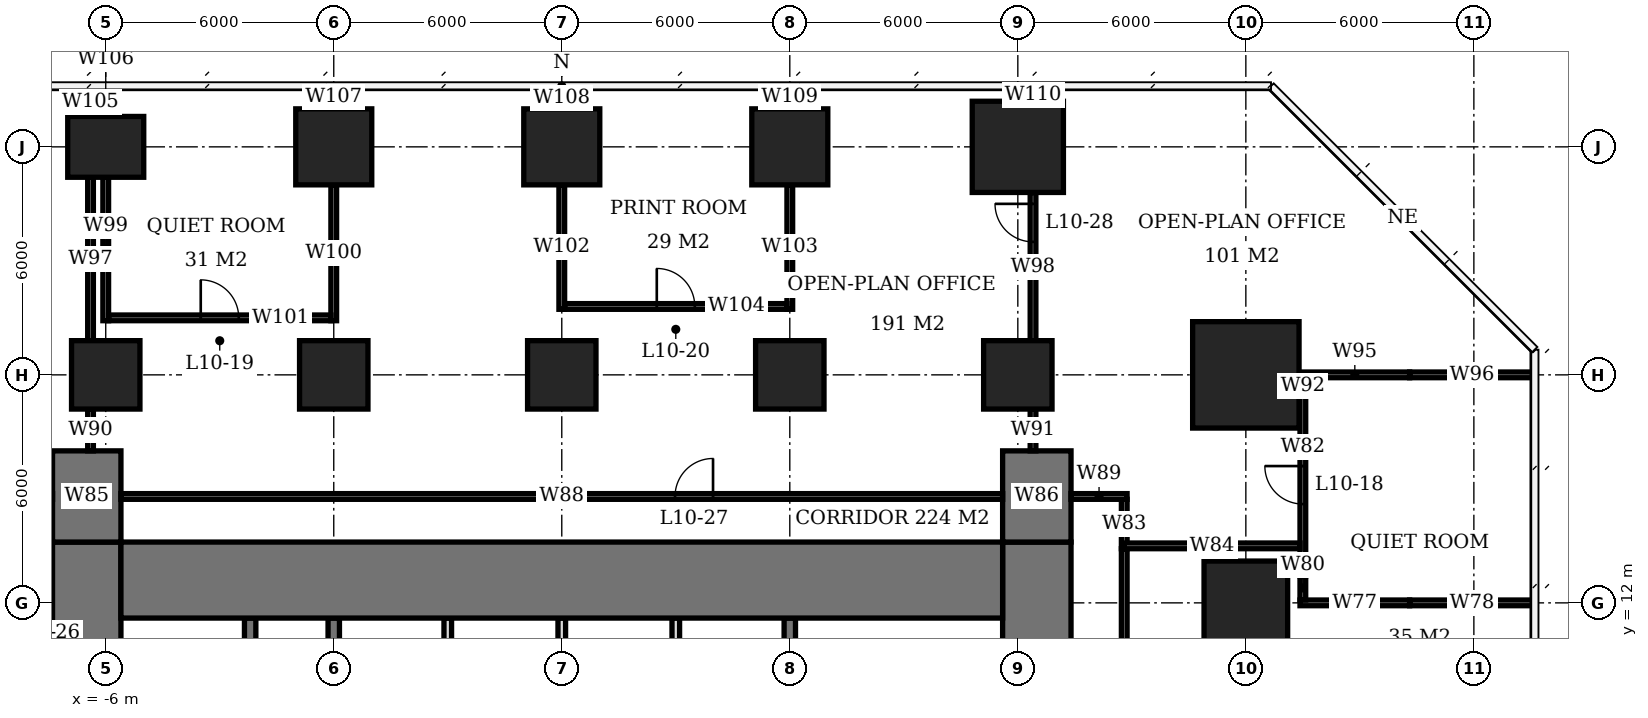
"""IFC4 building model, lengths in metres.
Left out: names, types, materials, properties, quantities, classifications, styles, units other than length and angle.
Written with IfcOpenShell. Run it as: python <this file> out.ifc"""

import sys

from ifc_helpers import new_model, si_unit, direction, frame, frame_2d, origin, origin_2d, place, context, subcontext, project, spatial, rectangle, extrude, element, fill, save


model = new_model("IFC4")
c1 = context("Model", 3, precision=1e-05, world=origin(), true_north=direction((0.0, 1.0)))
c2 = subcontext(c1, "Body", "Model", "MODEL_VIEW")
j1 = project(units=[si_unit("LENGTHUNIT", "METRE"), si_unit("PLANEANGLEUNIT", "RADIAN")], contexts=[c1])
p1 = place(None, origin())
s1 = spatial("IfcSite", under=j1, at=p1, CompositionType="ELEMENT")
p2 = place(p1, origin())
s2 = spatial("IfcBuilding", under=s1, at=p2, CompositionType="ELEMENT")
p3 = place(p2, frame((0.0, 0.0, 45.5)))
s3 = spatial("IfcBuildingStorey", under=s2, at=p3, CompositionType="ELEMENT", Elevation=45.5)
p4 = place(p3, frame((-6.0, 18.0, 0.0), z_axis=(0.0, 0.0, 1.0), x_axis=(1.0, 0.0, 0.0)))
e1 = element("IfcColumn", 1, at=p4, inside=s3, PredefinedType="COLUMN", context=c2, shape_type="SweptSolid", body=[
    extrude(rectangle(XDim=1.8, YDim=1.8, at=origin_2d()), origin(), (0.0, 0.0, 1.0), 3.9),
])
p5 = place(p3, frame((-6.0, 24.0, 0.0), z_axis=(0.0, 0.0, 1.0), x_axis=(1.0, 0.0, 0.0)))
e2 = element("IfcColumn", 2, at=p5, inside=s3, PredefinedType="COLUMN", context=c2, shape_type="SweptSolid", body=[
    extrude(rectangle(XDim=2.0, YDim=1.6, at=origin_2d()), origin(), (0.0, 0.0, 1.0), 3.9),
])
p6 = place(p3, frame((0.0, 18.0, 0.0), z_axis=(0.0, 0.0, 1.0), x_axis=(1.0, 0.0, 0.0)))
e3 = element("IfcColumn", 3, at=p6, inside=s3, PredefinedType="COLUMN", context=c2, shape_type="SweptSolid", body=[
    extrude(rectangle(XDim=1.8, YDim=1.8, at=origin_2d()), origin(), (0.0, 0.0, 1.0), 3.9),
])
p7 = place(p3, frame((0.0, 24.0, 0.0), z_axis=(0.0, 0.0, 1.0), x_axis=(1.0, 0.0, 0.0)))
e4 = element("IfcColumn", 4, at=p7, inside=s3, PredefinedType="COLUMN", context=c2, shape_type="SweptSolid", body=[
    extrude(rectangle(XDim=2.0, YDim=2.0, at=origin_2d()), origin(), (0.0, 0.0, 1.0), 3.9),
])
p8 = place(p3, frame((6.0, 18.0, 0.0), z_axis=(0.0, 0.0, 1.0), x_axis=(1.0, 0.0, 0.0)))
e5 = element("IfcColumn", 5, at=p8, inside=s3, PredefinedType="COLUMN", context=c2, shape_type="SweptSolid", body=[
    extrude(rectangle(XDim=1.8, YDim=1.8, at=origin_2d()), origin(), (0.0, 0.0, 1.0), 3.9),
])
p9 = place(p3, frame((6.0, 24.0, 0.0), z_axis=(0.0, 0.0, 1.0), x_axis=(1.0, 0.0, 0.0)))
e6 = element("IfcColumn", 6, at=p9, inside=s3, PredefinedType="COLUMN", context=c2, shape_type="SweptSolid", body=[
    extrude(rectangle(XDim=2.0, YDim=2.0, at=origin_2d()), origin(), (0.0, 0.0, 1.0), 3.9),
])
p10 = place(p3, frame((12.0, 18.0, 0.0), z_axis=(0.0, 0.0, 1.0), x_axis=(1.0, 0.0, 0.0)))
e7 = element("IfcColumn", 7, at=p10, inside=s3, PredefinedType="COLUMN", context=c2, shape_type="SweptSolid", body=[
    extrude(rectangle(XDim=1.8, YDim=1.8, at=origin_2d()), origin(), (0.0, 0.0, 1.0), 3.9),
])
p11 = place(p3, frame((12.0, 24.0, 0.0), z_axis=(0.0, 0.0, 1.0), x_axis=(1.0, 0.0, 0.0)))
e8 = element("IfcColumn", 8, at=p11, inside=s3, PredefinedType="COLUMN", context=c2, shape_type="SweptSolid", body=[
    extrude(rectangle(XDim=2.0, YDim=2.0, at=origin_2d()), origin(), (0.0, 0.0, 1.0), 3.9),
])
p12 = place(p3, frame((18.0, 18.0, 0.0), z_axis=(0.0, 0.0, 1.0), x_axis=(1.0, 0.0, 0.0)))
e9 = element("IfcColumn", 9, at=p12, inside=s3, PredefinedType="COLUMN", context=c2, shape_type="SweptSolid", body=[
    extrude(rectangle(XDim=1.8, YDim=1.8, at=origin_2d()), origin(), (0.0, 0.0, 1.0), 3.9),
])
p13 = place(p3, frame((18.0, 24.0, 0.0), z_axis=(0.0, 0.0, 1.0), x_axis=(1.0, 0.0, 0.0)))
e10 = element("IfcColumn", 10, at=p13, inside=s3, PredefinedType="COLUMN", context=c2, shape_type="SweptSolid", body=[
    extrude(rectangle(XDim=2.4, YDim=2.4, at=origin_2d()), origin(), (0.0, 0.0, 1.0), 3.9),
])
p14 = place(p3, frame((24.0, 12.0, 0.0), z_axis=(0.0, 0.0, 1.0), x_axis=(1.0, 0.0, 0.0)))
e11 = element("IfcColumn", 11, at=p14, inside=s3, PredefinedType="COLUMN", context=c2, shape_type="SweptSolid", body=[
    extrude(rectangle(XDim=2.2, YDim=2.2, at=origin_2d()), origin(), (0.0, 0.0, 1.0), 3.9),
])
p15 = place(p3, frame((24.0, 18.0, 0.0), z_axis=(0.0, 0.0, 1.0), x_axis=(1.0, 0.0, 0.0)))
e12 = element("IfcColumn", 12, at=p15, inside=s3, PredefinedType="COLUMN", context=c2, shape_type="SweptSolid", body=[
    extrude(rectangle(XDim=2.8, YDim=2.8, at=origin_2d()), origin(), (0.0, 0.0, 1.0), 3.9),
])
p16 = place(p3, frame((-5.6, 12.6, 0.0), z_axis=(0.0, 0.0, 1.0), x_axis=(1.0, 0.0, 0.0)))
e13 = element("IfcWall", 13, at=p16, inside=s3, PredefinedType="SHEAR", context=c2, shape_type="SweptSolid", body=[
    extrude(rectangle(XDim=23.2, YDim=2.0, at=frame_2d((11.6, 0.0))), origin(), (0.0, 0.0, 1.0), 3.9),
])
p17 = place(p3, frame((-6.5, -7.6, 0.0), z_axis=(0.0, 0.0, 1.0), x_axis=(0.0, 1.0, 0.0)))
e14 = element("IfcWall", 14, at=p17, inside=s3, PredefinedType="SHEAR", context=c2, shape_type="SweptSolid", body=[
    extrude(rectangle(XDim=21.2, YDim=1.8, at=frame_2d((10.6, 0.0))), origin(), (0.0, 0.0, 1.0), 3.9),
])
p18 = place(p17, frame((7.8, 0.0, 0.0)))
e15 = element("IfcOpeningElement", 15, at=p18, cuts=e14, PredefinedType="OPENING", context=c2, shape_type="SweptSolid", body=[
    extrude(rectangle(XDim=1.8, YDim=2.4, at=frame_2d((0.9, 1.2))), frame((0.0, 0.91, 0.0), z_axis=(0.0, -1.0, 0.0), x_axis=(1.0, 0.0, 0.0)), (0.0, 0.0, 1.0), 1.82),
])
p19 = place(p3, frame((18.5, -7.6, 0.0), z_axis=(0.0, 0.0, 1.0), x_axis=(0.0, 1.0, 0.0)))
e16 = element("IfcWall", 16, at=p19, inside=s3, PredefinedType="SHEAR", context=c2, shape_type="SweptSolid", body=[
    extrude(rectangle(XDim=21.2, YDim=1.8, at=frame_2d((10.6, 0.0))), origin(), (0.0, 0.0, 1.0), 3.9),
])
p20 = place(p19, frame((9.2, 0.0, 0.0)))
e17 = element("IfcOpeningElement", 17, at=p20, cuts=e16, PredefinedType="OPENING", context=c2, shape_type="SweptSolid", body=[
    extrude(rectangle(XDim=1.8, YDim=2.4, at=frame_2d((0.9, 1.2))), frame((0.0, 0.91, 0.0), z_axis=(0.0, -1.0, 0.0), x_axis=(1.0, 0.0, 0.0)), (0.0, 0.0, 1.0), 1.82),
])
for number, where, z_axis, x_axis in (
    (18, (-6.5, 13.6, 0.0), (0.0, 0.0, 1.0), (0.0, 1.0, 0.0)),
    (19, (18.5, 13.6, 0.0), (0.0, 0.0, 1.0), (0.0, 1.0, 0.0)),
):
    element("IfcWall", number, at=place(p3, frame(where, z_axis=z_axis, x_axis=x_axis)), inside=s3, PredefinedType="SHEAR", context=c2, shape_type="SweptSolid", body=[
        extrude(rectangle(XDim=2.4, YDim=1.8, at=frame_2d((1.2, 0.0))), origin(), (0.0, 0.0, 1.0), 3.9),
    ])
p21 = place(p3, frame((0.0, 3.15, 0.0), z_axis=(0.0, 0.0, 1.0), x_axis=(0.0, 1.0, 0.0)))
e20 = element("IfcWall", 20, at=p21, inside=s3, PredefinedType="SHEAR", context=c2, shape_type="SweptSolid", body=[
    extrude(rectangle(XDim=8.45, YDim=0.3, at=frame_2d((4.225, 0.0))), origin(), (0.0, 0.0, 1.0), 3.9),
])
p22 = place(p3, frame((12.0, 6.15, 0.0), z_axis=(0.0, 0.0, 1.0), x_axis=(0.0, 1.0, 0.0)))
e21 = element("IfcWall", 21, at=p22, inside=s3, PredefinedType="SHEAR", context=c2, shape_type="SweptSolid", body=[
    extrude(rectangle(XDim=5.45, YDim=0.3, at=frame_2d((2.725, 0.0))), origin(), (0.0, 0.0, 1.0), 3.9),
])
p23 = place(p3, frame((-2.2, 3.15, 0.0), z_axis=(0.0, 0.0, 1.0), x_axis=(0.0, 1.0, 0.0)))
e22 = element("IfcWall", 22, at=p23, inside=s3, PredefinedType="SHEAR", context=c2, shape_type="SweptSolid", body=[
    extrude(rectangle(XDim=8.45, YDim=0.3, at=frame_2d((4.225, 0.0))), origin(), (0.0, 0.0, 1.0), 3.9),
])
for number, where, z_axis, x_axis in (
    (23, (3.0, 6.15, 0.0), (0.0, 0.0, 1.0), (0.0, 1.0, 0.0)),
    (24, (6.0, 6.15, 0.0), (0.0, 0.0, 1.0), (0.0, 1.0, 0.0)),
    (25, (9.0, 6.15, 0.0), (0.0, 0.0, 1.0), (0.0, 1.0, 0.0)),
):
    element("IfcWall", number, at=place(p3, frame(where, z_axis=z_axis, x_axis=x_axis)), inside=s3, PredefinedType="SOLIDWALL", context=c2, shape_type="SweptSolid", body=[
        extrude(rectangle(XDim=5.45, YDim=0.2, at=frame_2d((2.725, 0.0))), origin(), (0.0, 0.0, 1.0), 3.9),
    ])
p24 = place(p3, frame((25.425, 12.0, 0.0), z_axis=(0.0, 0.0, 1.0), x_axis=(1.0, 0.0, 0.0)))
e26 = element("IfcWall", 26, at=p24, inside=s3, PredefinedType="PARTITIONING", context=c2, shape_type="SweptSolid", body=[
    extrude(rectangle(XDim=2.885, YDim=0.15, at=frame_2d((1.442, 0.0))), origin(), (0.0, 0.0, 1.0), 2.65),
])
p25 = place(p3, frame((28.31, 12.0, 0.0), z_axis=(0.0, 0.0, 1.0), x_axis=(1.0, 0.0, 0.0)))
e27 = element("IfcWall", 27, at=p25, inside=s3, PredefinedType="PARTITIONING", context=c2, shape_type="SweptSolid", body=[
    extrude(rectangle(XDim=3.29, YDim=0.15, at=frame_2d((1.645, 0.0))), origin(), (0.0, 0.0, 1.0), 3.65),
])
p26 = place(p3, frame((25.425, 18.0, 0.0), z_axis=(0.0, 0.0, 1.0), x_axis=(1.0, 0.0, 0.0)))
e28 = element("IfcWall", 28, at=p26, inside=s3, PredefinedType="PARTITIONING", context=c2, shape_type="SweptSolid", body=[
    extrude(rectangle(XDim=2.885, YDim=0.15, at=frame_2d((1.442, 0.0))), origin(), (0.0, 0.0, 1.0), 2.65),
])
p27 = place(p3, frame((28.31, 18.0, 0.0), z_axis=(0.0, 0.0, 1.0), x_axis=(1.0, 0.0, 0.0)))
e29 = element("IfcWall", 29, at=p27, inside=s3, PredefinedType="PARTITIONING", context=c2, shape_type="SweptSolid", body=[
    extrude(rectangle(XDim=3.29, YDim=0.15, at=frame_2d((1.645, 0.0))), origin(), (0.0, 0.0, 1.0), 3.65),
])
p28 = place(p3, frame((-5.925, 19.5, 0.0), z_axis=(0.0, 0.0, 1.0), x_axis=(1.0, 0.0, 0.0)))
e30 = element("IfcWall", 30, at=p28, inside=s3, PredefinedType="PARTITIONING", context=c2, shape_type="SweptSolid", body=[
    extrude(rectangle(XDim=5.85, YDim=0.15, at=frame_2d((2.925, 0.0))), origin(), (0.0, 0.0, 1.0), 3.65),
])
p29 = place(p28, frame((2.425, 0.0, 0.0)))
e31 = element("IfcOpeningElement", 31, at=p29, cuts=e30, PredefinedType="OPENING", context=c2, shape_type="SweptSolid", body=[
    extrude(rectangle(XDim=1.0, YDim=2.1, at=frame_2d((0.5, 1.05))), frame((0.0, 0.085, 0.0), z_axis=(0.0, -1.0, 0.0), x_axis=(1.0, 0.0, 0.0)), (0.0, 0.0, 1.0), 0.17),
])
p30 = place(p3, frame((6.075, 19.8, 0.0), z_axis=(0.0, 0.0, 1.0), x_axis=(1.0, 0.0, 0.0)))
e32 = element("IfcWall", 32, at=p30, inside=s3, PredefinedType="PARTITIONING", context=c2, shape_type="SweptSolid", body=[
    extrude(rectangle(XDim=5.85, YDim=0.15, at=frame_2d((2.925, 0.0))), origin(), (0.0, 0.0, 1.0), 3.65),
])
p31 = place(p30, frame((2.425, 0.0, 0.0)))
e33 = element("IfcOpeningElement", 33, at=p31, cuts=e32, PredefinedType="OPENING", context=c2, shape_type="SweptSolid", body=[
    extrude(rectangle(XDim=1.0, YDim=2.1, at=frame_2d((0.5, 1.05))), frame((0.0, 0.085, 0.0), z_axis=(0.0, -1.0, 0.0), x_axis=(1.0, 0.0, 0.0)), (0.0, 0.0, 1.0), 0.17),
])
p32 = place(p3, frame((-6.0, 19.425, 0.0), z_axis=(0.0, 0.0, 1.0), x_axis=(0.0, 1.0, 0.0)))
e34 = element("IfcWall", 34, at=p32, inside=s3, PredefinedType="PARTITIONING", context=c2, shape_type="SweptSolid", body=[
    extrude(rectangle(XDim=3.775, YDim=0.15, at=frame_2d((1.887, 0.0))), origin(), (0.0, 0.0, 1.0), 3.65),
])
p33 = place(p3, frame((-6.0, 24.8, 0.0), z_axis=(0.0, 0.0, 1.0), x_axis=(0.0, 1.0, 0.0)))
e35 = element("IfcWall", 35, at=p33, inside=s3, PredefinedType="PARTITIONING", context=c2, shape_type="SweptSolid", body=[
    extrude(rectangle(XDim=0.8, YDim=0.15, at=frame_2d((0.4, 0.0))), origin(), (0.0, 0.0, 1.0), 3.65),
])
p34 = place(p3, frame((0.0, 19.425, 0.0), z_axis=(0.0, 0.0, 1.0), x_axis=(0.0, 1.0, 0.0)))
e36 = element("IfcWall", 36, at=p34, inside=s3, PredefinedType="PARTITIONING", context=c2, shape_type="SweptSolid", body=[
    extrude(rectangle(XDim=3.575, YDim=0.15, at=frame_2d((1.788, 0.0))), origin(), (0.0, 0.0, 1.0), 3.65),
])
p35 = place(p3, frame((0.0, 25.0, 0.0), z_axis=(0.0, 0.0, 1.0), x_axis=(0.0, 1.0, 0.0)))
e37 = element("IfcWall", 37, at=p35, inside=s3, PredefinedType="PARTITIONING", context=c2, shape_type="SweptSolid", body=[
    extrude(rectangle(XDim=0.6, YDim=0.15, at=frame_2d((0.3, 0.0))), origin(), (0.0, 0.0, 1.0), 3.65),
])
p36 = place(p3, frame((6.0, 19.725, 0.0), z_axis=(0.0, 0.0, 1.0), x_axis=(0.0, 1.0, 0.0)))
e38 = element("IfcWall", 38, at=p36, inside=s3, PredefinedType="PARTITIONING", context=c2, shape_type="SweptSolid", body=[
    extrude(rectangle(XDim=3.275, YDim=0.15, at=frame_2d((1.637, 0.0))), origin(), (0.0, 0.0, 1.0), 3.65),
])
p37 = place(p3, frame((6.0, 25.0, 0.0), z_axis=(0.0, 0.0, 1.0), x_axis=(0.0, 1.0, 0.0)))
e39 = element("IfcWall", 39, at=p37, inside=s3, PredefinedType="PARTITIONING", context=c2, shape_type="SweptSolid", body=[
    extrude(rectangle(XDim=0.55, YDim=0.15, at=frame_2d((0.275, 0.0))), origin(), (0.0, 0.0, 1.0), 3.65),
])
p38 = place(p3, frame((12.0, 19.725, 0.0), z_axis=(0.0, 0.0, 1.0), x_axis=(0.0, 1.0, 0.0)))
e40 = element("IfcWall", 40, at=p38, inside=s3, PredefinedType="PARTITIONING", context=c2, shape_type="SweptSolid", body=[
    extrude(rectangle(XDim=3.275, YDim=0.15, at=frame_2d((1.637, 0.0))), origin(), (0.0, 0.0, 1.0), 3.65),
])
p39 = place(p3, frame((12.0, 25.0, 0.0), z_axis=(0.0, 0.0, 1.0), x_axis=(0.0, 1.0, 0.0)))
e41 = element("IfcWall", 41, at=p39, inside=s3, PredefinedType="PARTITIONING", context=c2, shape_type="SweptSolid", body=[
    extrude(rectangle(XDim=0.6, YDim=0.15, at=frame_2d((0.3, 0.0))), origin(), (0.0, 0.0, 1.0), 3.65),
])
p40 = place(p3, frame((25.5, 12.075, 0.0), z_axis=(0.0, 0.0, 1.0), x_axis=(0.0, 1.0, 0.0)))
e42 = element("IfcWall", 42, at=p40, inside=s3, PredefinedType="PARTITIONING", context=c2, shape_type="SweptSolid", body=[
    extrude(rectangle(XDim=0.635, YDim=0.15, at=frame_2d((0.317, 0.0))), origin(), (0.0, 0.0, 1.0), 2.65),
])
p41 = place(p3, frame((25.5, 12.71, 0.0), z_axis=(0.0, 0.0, 1.0), x_axis=(0.0, 1.0, 0.0)))
e43 = element("IfcWall", 43, at=p41, inside=s3, PredefinedType="PARTITIONING", context=c2, shape_type="SweptSolid", body=[
    extrude(rectangle(XDim=4.78, YDim=0.15, at=frame_2d((2.39, 0.0))), origin(), (0.0, 0.0, 1.0), 3.65),
])
p42 = place(p41, frame((1.89, 0.0, 0.0)))
e44 = element("IfcOpeningElement", 44, at=p42, cuts=e43, PredefinedType="OPENING", context=c2, shape_type="SweptSolid", body=[
    extrude(rectangle(XDim=1.0, YDim=2.1, at=frame_2d((0.5, 1.05))), frame((0.0, 0.085, 0.0), z_axis=(0.0, -1.0, 0.0), x_axis=(1.0, 0.0, 0.0)), (0.0, 0.0, 1.0), 0.17),
])
p43 = place(p3, frame((25.5, 17.49, 0.0), z_axis=(0.0, 0.0, 1.0), x_axis=(0.0, 1.0, 0.0)))
e45 = element("IfcWall", 45, at=p43, inside=s3, PredefinedType="PARTITIONING", context=c2, shape_type="SweptSolid", body=[
    extrude(rectangle(XDim=0.435, YDim=0.15, at=frame_2d((0.218, 0.0))), origin(), (0.0, 0.0, 1.0), 2.65),
])
p44 = place(p3, frame((-6.4, 16.0, 0.0), z_axis=(0.0, 0.0, 1.0), x_axis=(0.0, 1.0, 0.0)))
e46 = element("IfcWall", 46, at=p44, inside=s3, PredefinedType="PARTITIONING", context=c2, shape_type="SweptSolid", body=[
    extrude(rectangle(XDim=1.1, YDim=0.15, at=frame_2d((0.55, 0.0))), origin(), (0.0, 0.0, 1.0), 3.65),
])
p45 = place(p3, frame((-6.4, 18.9, 0.0), z_axis=(0.0, 0.0, 1.0), x_axis=(0.0, 1.0, 0.0)))
e47 = element("IfcWall", 47, at=p45, inside=s3, PredefinedType="PARTITIONING", context=c2, shape_type="SweptSolid", body=[
    extrude(rectangle(XDim=4.3, YDim=0.15, at=frame_2d((2.15, 0.0))), origin(), (0.0, 0.0, 1.0), 3.65),
])
p46 = place(p3, frame((-6.4, 24.8, 0.0), z_axis=(0.0, 0.0, 1.0), x_axis=(0.0, 1.0, 0.0)))
e48 = element("IfcWall", 48, at=p46, inside=s3, PredefinedType="PARTITIONING", context=c2, shape_type="SweptSolid", body=[
    extrude(rectangle(XDim=0.75, YDim=0.15, at=frame_2d((0.375, 0.0))), origin(), (0.0, 0.0, 1.0), 3.65),
])
p47 = place(p3, frame((-5.6, 14.8, 0.0), z_axis=(0.0, 0.0, 1.0), x_axis=(1.0, 0.0, 0.0)))
e49 = element("IfcWall", 49, at=p47, inside=s3, PredefinedType="PARTITIONING", context=c2, shape_type="SweptSolid", body=[
    extrude(rectangle(XDim=23.2, YDim=0.15, at=frame_2d((11.6, 0.0))), origin(), (0.0, 0.0, 1.0), 3.65),
])
p48 = place(p47, frame((14.58, 0.0, 0.0)))
e50 = element("IfcOpeningElement", 50, at=p48, cuts=e49, PredefinedType="OPENING", context=c2, shape_type="SweptSolid", body=[
    extrude(rectangle(XDim=1.0, YDim=2.1, at=frame_2d((0.5, 1.05))), frame((0.0, 0.085, 0.0), z_axis=(0.0, -1.0, 0.0), x_axis=(1.0, 0.0, 0.0)), (0.0, 0.0, 1.0), 0.17),
])
p49 = place(p3, frame((18.4, 16.0, 0.0), z_axis=(0.0, 0.0, 1.0), x_axis=(0.0, 1.0, 0.0)))
e51 = element("IfcWall", 51, at=p49, inside=s3, PredefinedType="PARTITIONING", context=c2, shape_type="SweptSolid", body=[
    extrude(rectangle(XDim=1.1, YDim=0.15, at=frame_2d((0.55, 0.0))), origin(), (0.0, 0.0, 1.0), 3.65),
])
p50 = place(p3, frame((18.4, 18.9, 0.0), z_axis=(0.0, 0.0, 1.0), x_axis=(0.0, 1.0, 0.0)))
e52 = element("IfcWall", 52, at=p50, inside=s3, PredefinedType="PARTITIONING", context=c2, shape_type="SweptSolid", body=[
    extrude(rectangle(XDim=3.9, YDim=0.15, at=frame_2d((1.95, 0.0))), origin(), (0.0, 0.0, 1.0), 3.65),
])
p51 = place(p50, frame((2.6, 0.0, 0.0)))
e53 = element("IfcOpeningElement", 53, at=p51, cuts=e52, PredefinedType="OPENING", context=c2, shape_type="SweptSolid", body=[
    extrude(rectangle(XDim=1.0, YDim=2.1, at=frame_2d((0.5, 1.05))), frame((0.0, 0.085, 0.0), z_axis=(0.0, -1.0, 0.0), x_axis=(1.0, 0.0, 0.0)), (0.0, 0.0, 1.0), 0.17),
])
p52 = place(p3, frame((18.4, 25.2, 0.0), z_axis=(0.0, 0.0, 1.0), x_axis=(0.0, 1.0, 0.0)))
e54 = element("IfcWall", 54, at=p52, inside=s3, PredefinedType="PARTITIONING", context=c2, shape_type="SweptSolid", body=[
    extrude(rectangle(XDim=0.35, YDim=0.15, at=frame_2d((0.175, 0.0))), origin(), (0.0, 0.0, 1.0), 3.65),
])
p53 = place(p3, frame((19.4, 14.8, 0.0), z_axis=(0.0, 0.0, 1.0), x_axis=(1.0, 0.0, 0.0)))
e55 = element("IfcWall", 55, at=p53, inside=s3, PredefinedType="PARTITIONING", context=c2, shape_type="SweptSolid", body=[
    extrude(rectangle(XDim=1.475, YDim=0.15, at=frame_2d((0.738, 0.0))), origin(), (0.0, 0.0, 1.0), 3.65),
])
p54 = place(p3, frame((20.8, 4.575, 0.0), z_axis=(0.0, 0.0, 1.0), x_axis=(0.0, 1.0, 0.0)))
e56 = element("IfcWall", 56, at=p54, inside=s3, PredefinedType="PARTITIONING", context=c2, shape_type="SweptSolid", body=[
    extrude(rectangle(XDim=8.85, YDim=0.15, at=frame_2d((4.425, 0.0))), origin(), (0.0, 0.0, 1.0), 3.65),
])
p55 = place(p54, frame((5.275, 0.0, 0.0)))
e57 = element("IfcOpeningElement", 57, at=p55, cuts=e56, PredefinedType="OPENING", context=c2, shape_type="SweptSolid", body=[
    extrude(rectangle(XDim=1.0, YDim=2.1, at=frame_2d((0.5, 1.05))), frame((0.0, 0.085, 0.0), z_axis=(0.0, -1.0, 0.0), x_axis=(1.0, 0.0, 0.0)), (0.0, 0.0, 1.0), 0.17),
])
p56 = place(p3, frame((20.8, 13.425, 0.0), z_axis=(0.0, 0.0, 1.0), x_axis=(0.0, 1.0, 0.0)))
e58 = element("IfcWall", 58, at=p56, inside=s3, PredefinedType="PARTITIONING", context=c2, shape_type="SweptSolid", body=[
    extrude(rectangle(XDim=1.3, YDim=0.15, at=frame_2d((0.65, 0.0))), origin(), (0.0, 0.0, 1.0), 3.65),
])
p57 = place(p3, frame((20.8, 13.5, 0.0), z_axis=(0.0, 0.0, 1.0), x_axis=(1.0, 0.0, 0.0)))
e59 = element("IfcWall", 59, at=p57, inside=s3, PredefinedType="PARTITIONING", context=c2, shape_type="SweptSolid", body=[
    extrude(rectangle(XDim=4.625, YDim=0.15, at=frame_2d((2.312, 0.0))), origin(), (0.0, 0.0, 1.0), 3.65),
])
p58 = place(p42, origin())
e60 = element("IfcDoor", 60, at=p58, inside=s3, OperationType="SINGLE_SWING_RIGHT", PredefinedType="DOOR", context=c2, shape_type="SweptSolid", body=[
    extrude(rectangle(XDim=1.0, YDim=2.1, at=frame_2d((0.5, 1.05))), frame((0.0, 0.025, 0.0), z_axis=(0.0, -1.0, 0.0), x_axis=(1.0, 0.0, 0.0)), (0.0, 0.0, 1.0), 0.05),
])
fill(e44, e60)
p59 = place(p29, origin())
e61 = element("IfcDoor", 61, at=p59, inside=s3, OperationType="SINGLE_SWING_LEFT", PredefinedType="DOOR", context=c2, shape_type="SweptSolid", body=[
    extrude(rectangle(XDim=1.0, YDim=2.1, at=frame_2d((0.5, 1.05))), frame((0.0, 0.025, 0.0), z_axis=(0.0, -1.0, 0.0), x_axis=(1.0, 0.0, 0.0)), (0.0, 0.0, 1.0), 0.05),
])
fill(e31, e61)
p60 = place(p31, origin())
e62 = element("IfcDoor", 62, at=p60, inside=s3, OperationType="SINGLE_SWING_LEFT", PredefinedType="DOOR", context=c2, shape_type="SweptSolid", body=[
    extrude(rectangle(XDim=1.0, YDim=2.1, at=frame_2d((0.5, 1.05))), frame((0.0, 0.025, 0.0), z_axis=(0.0, -1.0, 0.0), x_axis=(1.0, 0.0, 0.0)), (0.0, 0.0, 1.0), 0.05),
])
fill(e33, e62)
p61 = place(p48, origin())
e63 = element("IfcDoor", 63, at=p61, inside=s3, OperationType="SINGLE_SWING_RIGHT", PredefinedType="DOOR", context=c2, shape_type="SweptSolid", body=[
    extrude(rectangle(XDim=1.0, YDim=2.1, at=frame_2d((0.5, 1.05))), frame((0.0, 0.025, 0.0), z_axis=(0.0, -1.0, 0.0), x_axis=(1.0, 0.0, 0.0)), (0.0, 0.0, 1.0), 0.05),
])
fill(e50, e63)
p62 = place(p51, origin())
e64 = element("IfcDoor", 64, at=p62, inside=s3, OperationType="SINGLE_SWING_RIGHT", PredefinedType="DOOR", context=c2, shape_type="SweptSolid", body=[
    extrude(rectangle(XDim=1.0, YDim=2.1, at=frame_2d((0.5, 1.05))), frame((0.0, 0.025, 0.0), z_axis=(0.0, -1.0, 0.0), x_axis=(1.0, 0.0, 0.0)), (0.0, 0.0, 1.0), 0.05),
])
fill(e53, e64)
save(model, sys.argv[1])
